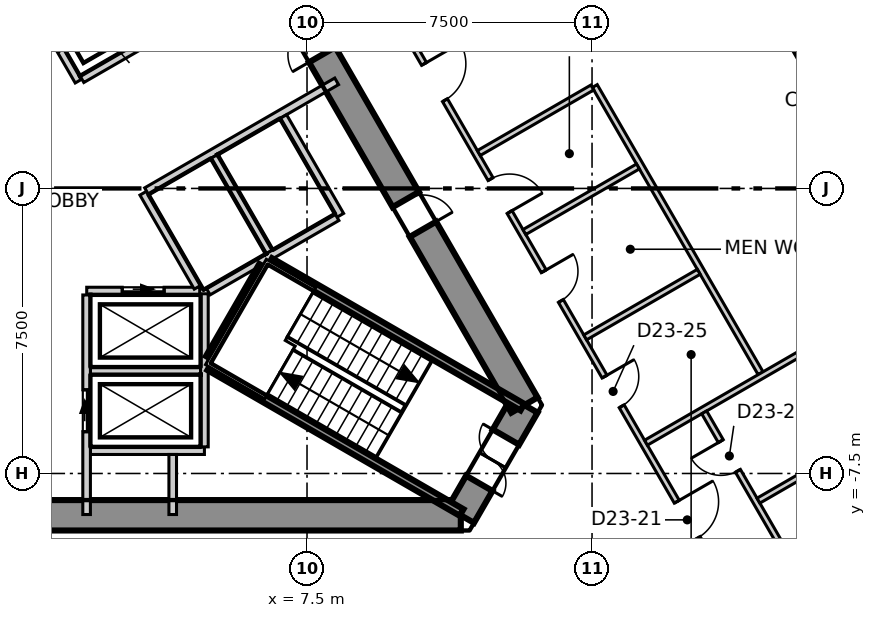
"""IFC4 building model, lengths in metres.
Left out: names, types, materials, properties, quantities, classifications, styles, units other than length and angle.
Written with IfcOpenShell. Run it as: python <this file> out.ifc"""

import sys

from ifc_helpers import new_model, si_unit, direction, frame, frame_2d, origin, origin_2d, place, context, subcontext, project, spatial, polyline, rectangle, outline, extrude, element, fill, save


model = new_model("IFC4")
c1 = context("Model", 3, precision=1e-05, world=origin(), true_north=direction((0.0, 1.0)))
c2 = subcontext(c1, "Body", "Model", "MODEL_VIEW")
j1 = project(units=[si_unit("LENGTHUNIT", "METRE"), si_unit("PLANEANGLEUNIT", "RADIAN")], contexts=[c1])
p1 = place(None, origin())
s1 = spatial("IfcSite", under=j1, at=p1, CompositionType="ELEMENT")
p2 = place(p1, origin())
s2 = spatial("IfcBuilding", under=s1, at=p2, CompositionType="ELEMENT")
p3 = place(p2, frame((0.0, 0.0, 104.3)))
s3 = spatial("IfcBuildingStorey", under=s2, at=p3, CompositionType="ELEMENT", Elevation=104.3)
p4 = place(p3, frame((-11.547, -8.6, -0.3), z_axis=(0.0, 0.0, 1.0), x_axis=(1.0, 0.0, 0.0)))
e1 = element("IfcWall", 1, at=p4, inside=s3, PredefinedType="SHEAR", context=c2, shape_type="SweptSolid", body=[
    extrude(outline(polyline([(-0.231, -0.4), (1.732, -0.4), (3.695, -0.4), (5.658, -0.4), (7.621, -0.4), (9.584, -0.4), (11.547, -0.4), (13.51, -0.4), (15.473, -0.4), (17.436, -0.4), (19.399, -0.4), (21.362, -0.4), (23.325, -0.4), (22.863, 0.4), (20.977, 0.4), (19.091, 0.4), (17.205, 0.4), (15.319, 0.4), (13.433, 0.4), (11.547, 0.4), (9.661, 0.4), (7.775, 0.4), (5.889, 0.4), (4.003, 0.4), (2.117, 0.4), (0.231, 0.4), (-0.231, -0.4)])), origin(), (0.0, 0.0, 1.0), 4.0),
])
p5 = place(p4, frame((4.414, 0.0, 0.3)))
e2 = element("IfcOpeningElement", 2, at=p5, cuts=e1, PredefinedType="OPENING", context=c2, shape_type="SweptSolid", body=[
    extrude(rectangle(XDim=1.0, YDim=2.1, at=frame_2d((0.5, 1.05))), frame((0.0, 0.41, 0.0), z_axis=(0.0, -1.0, 0.0), x_axis=(1.0, 0.0, 0.0)), (0.0, 0.0, 1.0), 0.82),
])
p6 = place(p3, frame((11.547, -8.6, -0.3), z_axis=(0.0, 0.0, 1.0), x_axis=(0.49987182685, 0.866099391942, 0.0)))
e3 = element("IfcWall", 3, at=p6, inside=s3, PredefinedType="SHEAR", context=c2, shape_type="SweptSolid", body=[
    extrude(outline(polyline([(-0.231, -0.4), (1.674, -0.4), (3.579, -0.4), (3.118, 0.4), (1.674, 0.4), (0.231, 0.4), (-0.231, -0.4)])), origin(), (0.0, 0.0, 1.0), 4.0),
])
p7 = place(p6, frame((0.974, 0.0, 0.3)))
e4 = element("IfcOpeningElement", 4, at=p7, cuts=e3, PredefinedType="OPENING", context=c2, shape_type="SweptSolid", body=[
    extrude(rectangle(XDim=1.4, YDim=2.1, at=frame_2d((0.7, 1.05))), frame((0.0, 0.41, 0.0), z_axis=(0.0, -1.0, 0.0), x_axis=(1.0, 0.0, 0.0)), (0.0, 0.0, 1.0), 0.82),
])
p8 = place(p3, frame((13.221, -5.7, -0.3), z_axis=(0.0, 0.0, 1.0), x_axis=(-0.499995765644, 0.866027848477, 0.0)))
e5 = element("IfcWall", 5, at=p8, inside=s3, PredefinedType="SHEAR", context=c2, shape_type="SweptSolid", body=[
    extrude(outline(polyline([(-0.231, -0.4), (1.732, -0.4), (3.695, -0.4), (5.658, -0.4), (7.621, -0.4), (9.584, -0.4), (11.547, -0.4), (13.51, -0.4), (15.473, -0.4), (17.436, -0.4), (19.399, -0.4), (21.362, -0.4), (23.325, -0.4), (22.863, 0.4), (20.977, 0.4), (19.091, 0.4), (17.205, 0.4), (15.319, 0.4), (13.433, 0.4), (11.547, 0.4), (9.661, 0.4), (7.775, 0.4), (5.889, 0.4), (4.003, 0.4), (2.117, 0.4), (0.231, 0.4), (-0.231, -0.4)])), origin(), (0.0, 0.0, 1.0), 4.0),
])
p9 = place(p8, frame((10.647, 0.0, 0.3)))
e6 = element("IfcOpeningElement", 6, at=p9, cuts=e5, PredefinedType="OPENING", context=c2, shape_type="SweptSolid", body=[
    extrude(rectangle(XDim=1.8, YDim=2.1, at=frame_2d((0.9, 1.05))), frame((0.0, 0.41, 0.0), z_axis=(0.0, -1.0, 0.0), x_axis=(1.0, 0.0, 0.0)), (0.0, 0.0, 1.0), 0.82),
])
p10 = place(p8, frame((5.343, 0.0, 0.3)))
e7 = element("IfcOpeningElement", 7, at=p10, cuts=e5, PredefinedType="OPENING", context=c2, shape_type="SweptSolid", body=[
    extrude(rectangle(XDim=0.9, YDim=2.1, at=frame_2d((0.45, 1.05))), frame((0.0, 0.41, 0.0), z_axis=(0.0, -1.0, 0.0), x_axis=(1.0, 0.0, 0.0)), (0.0, 0.0, 1.0), 0.82),
])
p11 = place(p3, frame((20.749, 3.895, -0.3), z_axis=(0.0, 0.0, 1.0), x_axis=(-0.5, 0.866025403784, 0.0)))
e8 = element("IfcColumn", 8, at=p11, inside=s3, PredefinedType="COLUMN", context=c2, shape_type="SweptSolid", body=[
    extrude(rectangle(XDim=1.3, YDim=1.0, at=origin_2d()), origin(), (0.0, 0.0, 1.0), 4.0),
])
p12 = place(p3, frame((32.51, -15.074, 0.0), z_axis=(0.0, 0.0, 1.0), x_axis=(-0.500008323105, 0.866020598384, 0.0)))
e9 = element("IfcWall", 9, at=p12, inside=s3, PredefinedType="ELEMENTEDWALL", context=c2, shape_type="SweptSolid", body=[
    extrude(rectangle(XDim=58.599, YDim=0.2, at=frame_2d((29.3, 0.0))), origin(), (0.0, 0.0, 1.0), 3.7),
])
p13 = place(p12, frame((2.354, 0.0, 0.9)))
e10 = element("IfcOpeningElement", 10, at=p13, cuts=e9, PredefinedType="OPENING", context=c2, shape_type="SweptSolid", body=[
    extrude(rectangle(XDim=4.9, YDim=2.5, at=frame_2d((2.45, 1.25))), frame((0.0, 0.11, 0.0), z_axis=(0.0, -1.0, 0.0), x_axis=(1.0, 0.0, 0.0)), (0.0, 0.0, 1.0), 0.22),
])
p14 = place(p12, frame((9.355, 0.0, 0.9)))
e11 = element("IfcOpeningElement", 11, at=p14, cuts=e9, PredefinedType="OPENING", context=c2, shape_type="SweptSolid", body=[
    extrude(rectangle(XDim=4.9, YDim=2.5, at=frame_2d((2.45, 1.25))), frame((0.0, 0.11, 0.0), z_axis=(0.0, -1.0, 0.0), x_axis=(1.0, 0.0, 0.0)), (0.0, 0.0, 1.0), 0.22),
])
p15 = place(p12, frame((16.357, 0.0, 0.9)))
e12 = element("IfcOpeningElement", 12, at=p15, cuts=e9, PredefinedType="OPENING", context=c2, shape_type="SweptSolid", body=[
    extrude(rectangle(XDim=4.9, YDim=2.5, at=frame_2d((2.45, 1.25))), frame((0.0, 0.11, 0.0), z_axis=(0.0, -1.0, 0.0), x_axis=(1.0, 0.0, 0.0)), (0.0, 0.0, 1.0), 0.22),
])
p16 = place(p12, frame((23.359, 0.0, 0.9)))
e13 = element("IfcOpeningElement", 13, at=p16, cuts=e9, PredefinedType="OPENING", context=c2, shape_type="SweptSolid", body=[
    extrude(rectangle(XDim=4.9, YDim=2.5, at=frame_2d((2.45, 1.25))), frame((0.0, 0.11, 0.0), z_axis=(0.0, -1.0, 0.0), x_axis=(1.0, 0.0, 0.0)), (0.0, 0.0, 1.0), 0.22),
])
p17 = place(p12, frame((30.36, 0.0, 0.9)))
e14 = element("IfcOpeningElement", 14, at=p17, cuts=e9, PredefinedType="OPENING", context=c2, shape_type="SweptSolid", body=[
    extrude(rectangle(XDim=4.9, YDim=2.5, at=frame_2d((2.45, 1.25))), frame((0.0, 0.11, 0.0), z_axis=(0.0, -1.0, 0.0), x_axis=(1.0, 0.0, 0.0)), (0.0, 0.0, 1.0), 0.22),
])
p18 = place(p12, frame((37.362, 0.0, 0.9)))
e15 = element("IfcOpeningElement", 15, at=p18, cuts=e9, PredefinedType="OPENING", context=c2, shape_type="SweptSolid", body=[
    extrude(rectangle(XDim=4.9, YDim=2.5, at=frame_2d((2.45, 1.25))), frame((0.0, 0.11, 0.0), z_axis=(0.0, -1.0, 0.0), x_axis=(1.0, 0.0, 0.0)), (0.0, 0.0, 1.0), 0.22),
])
p19 = place(p12, frame((44.364, 0.0, 0.9)))
e16 = element("IfcOpeningElement", 16, at=p19, cuts=e9, PredefinedType="OPENING", context=c2, shape_type="SweptSolid", body=[
    extrude(rectangle(XDim=4.9, YDim=2.5, at=frame_2d((2.45, 1.25))), frame((0.0, 0.11, 0.0), z_axis=(0.0, -1.0, 0.0), x_axis=(1.0, 0.0, 0.0)), (0.0, 0.0, 1.0), 0.22),
])
p20 = place(p12, frame((51.365, 0.0, 0.9)))
e17 = element("IfcOpeningElement", 17, at=p20, cuts=e9, PredefinedType="OPENING", context=c2, shape_type="SweptSolid", body=[
    extrude(rectangle(XDim=4.9, YDim=2.5, at=frame_2d((2.45, 1.25))), frame((0.0, 0.11, 0.0), z_axis=(0.0, -1.0, 0.0), x_axis=(1.0, 0.0, 0.0)), (0.0, 0.0, 1.0), 0.22),
])
p21 = place(p3, frame((9.804, 4.62, 0.0), z_axis=(0.0, 0.0, 1.0), x_axis=(0.49996419592, -0.866046074293, 0.0)))
e18 = element("IfcWall", 18, at=p21, inside=s3, PredefinedType="PARTITIONING", context=c2, shape_type="SweptSolid", body=[
    extrude(rectangle(XDim=17.718, YDim=0.15, at=frame_2d((8.859, 0.0))), origin(), (0.0, 0.0, 1.0), 3.7),
])
p22 = place(p21, frame((14.854, 0.0, 0.0)))
e19 = element("IfcOpeningElement", 19, at=p22, cuts=e18, PredefinedType="OPENING", context=c2, shape_type="SweptSolid", body=[
    extrude(rectangle(XDim=1.1, YDim=2.1, at=frame_2d((0.55, 1.05))), frame((0.0, 0.085, 0.0), z_axis=(0.0, -1.0, 0.0), x_axis=(1.0, 0.0, 0.0)), (0.0, 0.0, 1.0), 0.17),
])
p23 = place(p21, frame((1.552, 0.0, 0.0)))
e20 = element("IfcOpeningElement", 20, at=p23, cuts=e18, PredefinedType="OPENING", context=c2, shape_type="SweptSolid", body=[
    extrude(rectangle(XDim=1.1, YDim=2.1, at=frame_2d((0.55, 1.05))), frame((0.0, 0.085, 0.0), z_axis=(0.0, -1.0, 0.0), x_axis=(1.0, 0.0, 0.0)), (0.0, 0.0, 1.0), 0.17),
])
p24 = place(p21, frame((11.052, 0.0, 0.0)))
e21 = element("IfcOpeningElement", 21, at=p24, cuts=e18, PredefinedType="OPENING", context=c2, shape_type="SweptSolid", body=[
    extrude(rectangle(XDim=0.9, YDim=2.1, at=frame_2d((0.45, 1.05))), frame((0.0, 0.085, 0.0), z_axis=(0.0, -1.0, 0.0), x_axis=(1.0, 0.0, 0.0)), (0.0, 0.0, 1.0), 0.17),
])
p25 = place(p21, frame((7.852, 0.0, 0.0)))
e22 = element("IfcOpeningElement", 22, at=p25, cuts=e18, PredefinedType="OPENING", context=c2, shape_type="SweptSolid", body=[
    extrude(rectangle(XDim=0.9, YDim=2.1, at=frame_2d((0.45, 1.05))), frame((0.0, 0.085, 0.0), z_axis=(0.0, -1.0, 0.0), x_axis=(1.0, 0.0, 0.0)), (0.0, 0.0, 1.0), 0.17),
])
p26 = place(p21, frame((5.052, 0.0, 0.0)))
e23 = element("IfcOpeningElement", 23, at=p26, cuts=e18, PredefinedType="OPENING", context=c2, shape_type="SweptSolid", body=[
    extrude(rectangle(XDim=1.0, YDim=2.1, at=frame_2d((0.5, 1.05))), frame((0.0, 0.085, 0.0), z_axis=(0.0, -1.0, 0.0), x_axis=(1.0, 0.0, 0.0)), (0.0, 0.0, 1.0), 0.17),
])
p27 = place(p3, frame((15.072, 2.694, 0.0), z_axis=(0.0, 0.0, 1.0), x_axis=(0.500042162787, -0.86600105972, 0.0)))
e24 = element("IfcWall", 24, at=p27, inside=s3, PredefinedType="PARTITIONING", context=c2, shape_type="SweptSolid", body=[
    extrude(rectangle(XDim=8.725, YDim=0.15, at=frame_2d((4.363, 0.0))), origin(), (0.0, 0.0, 1.0), 3.7),
])
for number, where, z_axis, x_axis in (
    (25, (12.02, 0.931, 0.0), (0.0, 0.0, 1.0), (0.866, 0.5, 0.0)),
    (26, (13.22, -1.147, 0.0), (0.0, 0.0, 1.0), (0.866, 0.5, 0.0)),
    (27, (14.82, -3.919, 0.0), (0.0, 0.0, 1.0), (0.866, 0.5, 0.0)),
):
    element("IfcWall", number, at=place(p3, frame(where, z_axis=z_axis, x_axis=x_axis)), inside=s3, PredefinedType="PARTITIONING", context=c2, shape_type="SweptSolid", body=[
        extrude(rectangle(XDim=3.45, YDim=0.15, at=frame_2d((1.725, 0.0))), origin(), (0.0, 0.0, 1.0), 3.7),
    ])
p28 = place(p3, frame((16.42, -6.69, 0.0), z_axis=(0.0, 0.0, 1.0), x_axis=(0.866013897511, 0.50001992892, 0.0)))
e28 = element("IfcWall", 28, at=p28, inside=s3, PredefinedType="PARTITIONING", context=c2, shape_type="SweptSolid", body=[
    extrude(rectangle(XDim=9.662, YDim=0.15, at=frame_2d((4.831, 0.0))), origin(), (0.0, 0.0, 1.0), 3.7),
])
p29 = place(p3, frame((17.951, -5.892, 0.0), z_axis=(0.0, 0.0, 1.0), x_axis=(0.500083244257, -0.865977337356, 0.0)))
e29 = element("IfcWall", 29, at=p29, inside=s3, PredefinedType="PARTITIONING", context=c2, shape_type="SweptSolid", body=[
    extrude(rectangle(XDim=5.525, YDim=0.15, at=frame_2d((2.763, 0.0))), origin(), (0.0, 0.0, 1.0), 3.7),
])
p30 = place(p29, frame((0.875, 0.0, 0.0)))
e30 = element("IfcOpeningElement", 30, at=p30, cuts=e29, PredefinedType="OPENING", context=c2, shape_type="SweptSolid", body=[
    extrude(rectangle(XDim=0.9, YDim=2.1, at=frame_2d((0.45, 1.05))), frame((0.0, 0.085, 0.0), z_axis=(0.0, -1.0, 0.0), x_axis=(1.0, 0.0, 0.0)), (0.0, 0.0, 1.0), 0.17),
])
p31 = place(p3, frame((19.379, -8.215, 0.0), z_axis=(0.0, 0.0, 1.0), x_axis=(0.86599666273, 0.500049777664, 0.0)))
e31 = element("IfcWall", 31, at=p31, inside=s3, PredefinedType="PARTITIONING", context=c2, shape_type="SweptSolid", body=[
    extrude(rectangle(XDim=3.25, YDim=0.15, at=frame_2d((1.625, 0.0))), origin(), (0.0, 0.0, 1.0), 3.7),
])
p32 = place(p3, frame((1.8, -4.8, 0.0), z_axis=(0.0, 0.0, 1.0), x_axis=(1.0, 0.0, 0.0)))
e32 = element("IfcWall", 32, at=p32, inside=s3, PredefinedType="SOLIDWALL", context=c2, shape_type="SweptSolid", body=[
    extrude(rectangle(XDim=2.9, YDim=0.2, at=frame_2d((1.45, 0.0))), origin(), (0.0, 0.0, 1.0), 3.7),
])
p33 = place(p3, frame((1.8, -6.9, 0.0), z_axis=(0.0, 0.0, 1.0), x_axis=(1.0, 0.0, 0.0)))
e33 = element("IfcWall", 33, at=p33, inside=s3, PredefinedType="SOLIDWALL", context=c2, shape_type="SweptSolid", body=[
    extrude(rectangle(XDim=3.0, YDim=0.2, at=frame_2d((1.5, 0.0))), origin(), (0.0, 0.0, 1.0), 3.7),
])
p34 = place(p3, frame((1.703, -2.7, 0.0), z_axis=(0.0, 0.0, 1.0), x_axis=(1.0, 0.0, 0.0)))
e34 = element("IfcWall", 34, at=p34, inside=s3, PredefinedType="SOLIDWALL", context=c2, shape_type="SweptSolid", body=[
    extrude(rectangle(XDim=2.973, YDim=0.2, at=frame_2d((1.487, 0.0))), origin(), (0.0, 0.0, 1.0), 3.7),
])
p35 = place(p34, frame((0.936, 0.0, 0.0)))
e35 = element("IfcOpeningElement", 35, at=p35, cuts=e34, PredefinedType="OPENING", context=c2, shape_type="SweptSolid", body=[
    extrude(rectangle(XDim=1.1, YDim=2.1, at=frame_2d((0.55, 1.05))), frame((0.0, 0.11, 0.0), z_axis=(0.0, -1.0, 0.0), x_axis=(1.0, 0.0, 0.0)), (0.0, 0.0, 1.0), 0.22),
])
p36 = place(p3, frame((0.0, 5.4, 0.0), z_axis=(0.0, 0.0, 1.0), x_axis=(0.500103862429, -0.865965430478, 0.0)))
e36 = element("IfcWall", 36, at=p36, inside=s3, PredefinedType="SOLIDWALL", context=c2, shape_type="SweptSolid", body=[
    extrude(rectangle(XDim=2.973, YDim=0.2, at=frame_2d((1.487, 0.0))), origin(), (0.0, 0.0, 1.0), 3.7),
])
p37 = place(p36, frame((0.937, 0.0, 0.0)))
e37 = element("IfcOpeningElement", 37, at=p37, cuts=e36, PredefinedType="OPENING", context=c2, shape_type="SweptSolid", body=[
    extrude(rectangle(XDim=1.1, YDim=2.1, at=frame_2d((0.55, 1.05))), frame((0.0, 0.11, 0.0), z_axis=(0.0, -1.0, 0.0), x_axis=(1.0, 0.0, 0.0)), (0.0, 0.0, 1.0), 0.22),
])
p38 = place(p3, frame((3.19, -0.125, 0.0), z_axis=(0.0, 0.0, 1.0), x_axis=(0.499988658015, -0.866031951983, 0.0)))
e38 = element("IfcWall", 38, at=p38, inside=s3, PredefinedType="SOLIDWALL", context=c2, shape_type="SweptSolid", body=[
    extrude(rectangle(XDim=2.858, YDim=0.2, at=frame_2d((1.429, 0.0))), origin(), (0.0, 0.0, 1.0), 3.7),
])
p39 = place(p3, frame((1.577, 2.874, 0.0), z_axis=(0.0, 0.0, 1.0), x_axis=(0.866073694534, 0.499916348638, 0.0)))
e39 = element("IfcWall", 39, at=p39, inside=s3, PredefinedType="SOLIDWALL", context=c2, shape_type="SweptSolid", body=[
    extrude(rectangle(XDim=5.777, YDim=0.2, at=frame_2d((2.888, 0.0))), origin(), (0.0, 0.0, 1.0), 3.7),
])
p40 = place(p39, frame((2.497, 0.0, 0.0)))
e40 = element("IfcOpeningElement", 40, at=p40, cuts=e39, PredefinedType="OPENING", context=c2, shape_type="SweptSolid", body=[
    extrude(rectangle(XDim=1.1, YDim=2.1, at=frame_2d((0.55, 1.05))), frame((0.0, 0.11, 0.0), z_axis=(0.0, -1.0, 0.0), x_axis=(1.0, 0.0, 0.0)), (0.0, 0.0, 1.0), 0.22),
])
p41 = place(p3, frame((1.7, -8.58, 0.0), z_axis=(0.0, 0.0, 1.0), x_axis=(0.0, 1.0, 0.0)))
e41 = element("IfcWall", 41, at=p41, inside=s3, PredefinedType="SOLIDWALL", context=c2, shape_type="SweptSolid", body=[
    extrude(rectangle(XDim=5.777, YDim=0.2, at=frame_2d((2.889, 0.0))), origin(), (0.0, 0.0, 1.0), 3.7),
])
p42 = place(p41, frame((2.18, 0.0, 0.0)))
e42 = element("IfcOpeningElement", 42, at=p42, cuts=e41, PredefinedType="OPENING", context=c2, shape_type="SweptSolid", body=[
    extrude(rectangle(XDim=1.1, YDim=2.1, at=frame_2d((0.55, 1.05))), frame((0.0, 0.11, 0.0), z_axis=(0.0, -1.0, 0.0), x_axis=(1.0, 0.0, 0.0)), (0.0, 0.0, 1.0), 0.22),
])
p43 = place(p3, frame((4.8, -6.8, 0.0), z_axis=(0.0, 0.0, 1.0), x_axis=(0.0, 1.0, 0.0)))
e43 = element("IfcWall", 43, at=p43, inside=s3, PredefinedType="SOLIDWALL", context=c2, shape_type="SweptSolid", body=[
    extrude(rectangle(XDim=4.029, YDim=0.2, at=frame_2d((2.015, 0.0))), origin(), (0.0, 0.0, 1.0), 3.7),
])
p44 = place(p3, frame((3.278, -0.071, 0.0), z_axis=(0.0, 0.0, 1.0), x_axis=(0.865929348003, 0.5001663366, 0.0)))
e44 = element("IfcWall", 44, at=p44, inside=s3, PredefinedType="SOLIDWALL", context=c2, shape_type="SweptSolid", body=[
    extrude(rectangle(XDim=5.776, YDim=0.2, at=frame_2d((2.888, 0.0))), origin(), (0.0, 0.0, 1.0), 3.7),
])
p45 = place(p3, frame((6.876, 1.891, 0.0), z_axis=(0.0, 0.0, 1.0), x_axis=(0.499990139034, -0.866031096941, 0.0)))
e45 = element("IfcWall", 45, at=p45, inside=s3, PredefinedType="SOLIDWALL", context=c2, shape_type="SweptSolid", body=[
    extrude(rectangle(XDim=3.0, YDim=0.2, at=frame_2d((1.5, 0.0))), origin(), (0.0, 0.0, 1.0), 3.7),
])
p46 = place(p3, frame((5.057, 0.841, 0.0), z_axis=(0.0, 0.0, 1.0), x_axis=(0.50012328804, -0.865954211699, 0.0)))
e46 = element("IfcWall", 46, at=p46, inside=s3, PredefinedType="SOLIDWALL", context=c2, shape_type="SweptSolid", body=[
    extrude(rectangle(XDim=2.9, YDim=0.2, at=frame_2d((1.45, 0.0))), origin(), (0.0, 0.0, 1.0), 3.7),
])
p47 = place(p3, frame((4.9, -2.714, 0.0), z_axis=(0.0, 0.0, 1.0), x_axis=(0.865992350556, 0.500057245502, 0.0)))
e47 = element("IfcWall", 47, at=p47, inside=s3, PredefinedType="SOLIDWALL", context=c2, shape_type="SweptSolid", body=[
    extrude(rectangle(XDim=3.914, YDim=0.2, at=frame_2d((1.957, 0.0))), origin(), (0.0, 0.0, 1.0), 3.7),
])
p48 = place(p3, frame((3.966, -8.58, 0.0), z_axis=(0.0, 0.0, 1.0), x_axis=(0.0, 1.0, 0.0)))
e48 = element("IfcWall", 48, at=p48, inside=s3, PredefinedType="SOLIDWALL", context=c2, shape_type="SweptSolid", body=[
    extrude(rectangle(XDim=1.58, YDim=0.2, at=frame_2d((0.79, 0.0))), origin(), (0.0, 0.0, 1.0), 3.7),
])
p49 = place(p3, frame((4.929, -4.693, 0.0), z_axis=(0.0, 0.0, 1.0), x_axis=(0.866005769735, -0.50003400563, 0.0)))
e49 = element("IfcWall", 49, at=p49, inside=s3, PredefinedType="SOLIDWALL", context=c2, shape_type="SweptSolid", body=[
    extrude(rectangle(XDim=7.665, YDim=0.2, at=frame_2d((3.833, 0.0))), origin(), (0.0, 0.0, 1.0), 3.7),
])
p50 = place(p3, frame((4.929, -4.462, 0.0), z_axis=(0.0, 0.0, 1.0), x_axis=(0.500200581029, 0.865909567298, 0.0)))
e50 = element("IfcWall", 50, at=p50, inside=s3, PredefinedType="SOLIDWALL", context=c2, shape_type="SweptSolid", body=[
    extrude(rectangle(XDim=2.799, YDim=0.2, at=frame_2d((1.399, 0.0))), origin(), (0.0, 0.0, 1.0), 3.7),
])
p51 = place(p3, frame((6.529, -1.922, 0.0), z_axis=(0.0, 0.0, 1.0), x_axis=(0.866060938598, -0.499938446846, 0.0)))
e51 = element("IfcWall", 51, at=p51, inside=s3, PredefinedType="SOLIDWALL", context=c2, shape_type="SweptSolid", body=[
    extrude(rectangle(XDim=7.665, YDim=0.2, at=frame_2d((3.832, 0.0))), origin(), (0.0, 0.0, 1.0), 3.7),
])
p52 = place(p35, origin())
e52 = element("IfcDoor", 52, at=p52, inside=s3, OperationType="SLIDING_TO_LEFT", PredefinedType="DOOR", context=c2, shape_type="SweptSolid", body=[
    extrude(rectangle(XDim=1.1, YDim=2.1, at=frame_2d((0.55, 1.05))), frame((0.0, 0.025, 0.0), z_axis=(0.0, -1.0, 0.0), x_axis=(1.0, 0.0, 0.0)), (0.0, 0.0, 1.0), 0.05),
])
fill(e35, e52)
p53 = place(p42, origin())
e53 = element("IfcDoor", 53, at=p53, inside=s3, OperationType="SLIDING_TO_LEFT", PredefinedType="DOOR", context=c2, shape_type="SweptSolid", body=[
    extrude(rectangle(XDim=1.1, YDim=2.1, at=frame_2d((0.55, 1.05))), frame((0.0, 0.025, 0.0), z_axis=(0.0, -1.0, 0.0), x_axis=(1.0, 0.0, 0.0)), (0.0, 0.0, 1.0), 0.05),
])
fill(e42, e53)
p54 = place(p22, origin())
e54 = element("IfcDoor", 54, at=p54, inside=s3, OperationType="SINGLE_SWING_RIGHT", PredefinedType="DOOR", context=c2, shape_type="SweptSolid", body=[
    extrude(rectangle(XDim=1.1, YDim=2.1, at=frame_2d((0.55, 1.05))), frame((0.0, 0.025, 0.0), z_axis=(0.0, -1.0, 0.0), x_axis=(1.0, 0.0, 0.0)), (0.0, 0.0, 1.0), 0.05),
])
fill(e19, e54)
p55 = place(p30, origin())
e55 = element("IfcDoor", 55, at=p55, inside=s3, OperationType="SINGLE_SWING_LEFT", PredefinedType="DOOR", context=c2, shape_type="SweptSolid", body=[
    extrude(rectangle(XDim=0.9, YDim=2.1, at=frame_2d((0.45, 1.05))), frame((0.0, 0.025, 0.0), z_axis=(0.0, -1.0, 0.0), x_axis=(1.0, 0.0, 0.0)), (0.0, 0.0, 1.0), 0.05),
])
fill(e30, e55)
p56 = place(p23, origin())
e56 = element("IfcDoor", 56, at=p56, inside=s3, OperationType="SINGLE_SWING_RIGHT", PredefinedType="DOOR", context=c2, shape_type="SweptSolid", body=[
    extrude(rectangle(XDim=1.1, YDim=2.1, at=frame_2d((0.55, 1.05))), frame((0.0, 0.025, 0.0), z_axis=(0.0, -1.0, 0.0), x_axis=(1.0, 0.0, 0.0)), (0.0, 0.0, 1.0), 0.05),
])
fill(e20, e56)
p57 = place(p24, origin())
e57 = element("IfcDoor", 57, at=p57, inside=s3, OperationType="SINGLE_SWING_RIGHT", PredefinedType="DOOR", context=c2, shape_type="SweptSolid", body=[
    extrude(rectangle(XDim=0.9, YDim=2.1, at=frame_2d((0.45, 1.05))), frame((0.0, 0.025, 0.0), z_axis=(0.0, -1.0, 0.0), x_axis=(1.0, 0.0, 0.0)), (0.0, 0.0, 1.0), 0.05),
])
fill(e21, e57)
p58 = place(p25, origin())
e58 = element("IfcDoor", 58, at=p58, inside=s3, OperationType="SINGLE_SWING_RIGHT", PredefinedType="DOOR", context=c2, shape_type="SweptSolid", body=[
    extrude(rectangle(XDim=0.9, YDim=2.1, at=frame_2d((0.45, 1.05))), frame((0.0, 0.025, 0.0), z_axis=(0.0, -1.0, 0.0), x_axis=(1.0, 0.0, 0.0)), (0.0, 0.0, 1.0), 0.05),
])
fill(e22, e58)
p59 = place(p26, origin())
e59 = element("IfcDoor", 59, at=p59, inside=s3, OperationType="SINGLE_SWING_LEFT", PredefinedType="DOOR", context=c2, shape_type="SweptSolid", body=[
    extrude(rectangle(XDim=1.0, YDim=2.1, at=frame_2d((0.5, 1.05))), frame((0.0, 0.025, 0.0), z_axis=(0.0, -1.0, 0.0), x_axis=(1.0, 0.0, 0.0)), (0.0, 0.0, 1.0), 0.05),
])
fill(e23, e59)
p60 = place(p9, origin())
e60 = element("IfcDoor", 60, at=p60, inside=s3, OperationType="DOUBLE_DOOR_SINGLE_SWING", PredefinedType="DOOR", context=c2, shape_type="SweptSolid", body=[
    extrude(rectangle(XDim=1.8, YDim=2.1, at=frame_2d((0.9, 1.05))), frame((0.0, 0.025, 0.0), z_axis=(0.0, -1.0, 0.0), x_axis=(1.0, 0.0, 0.0)), (0.0, 0.0, 1.0), 0.05),
])
fill(e6, e60)
p61 = place(p7, origin())
e61 = element("IfcDoor", 61, at=p61, inside=s3, OperationType="DOUBLE_DOOR_SINGLE_SWING", PredefinedType="DOOR", context=c2, shape_type="SweptSolid", body=[
    extrude(rectangle(XDim=1.4, YDim=2.1, at=frame_2d((0.7, 1.05))), frame((0.0, 0.025, 0.0), z_axis=(0.0, -1.0, 0.0), x_axis=(1.0, 0.0, 0.0)), (0.0, 0.0, 1.0), 0.05),
])
fill(e4, e61)
p62 = place(p10, origin())
e62 = element("IfcDoor", 62, at=p62, inside=s3, OperationType="SINGLE_SWING_LEFT", PredefinedType="DOOR", context=c2, shape_type="SweptSolid", body=[
    extrude(rectangle(XDim=0.9, YDim=2.1, at=frame_2d((0.45, 1.05))), frame((0.0, 0.025, 0.0), z_axis=(0.0, -1.0, 0.0), x_axis=(1.0, 0.0, 0.0)), (0.0, 0.0, 1.0), 0.05),
])
fill(e7, e62)
save(model, sys.argv[1])
